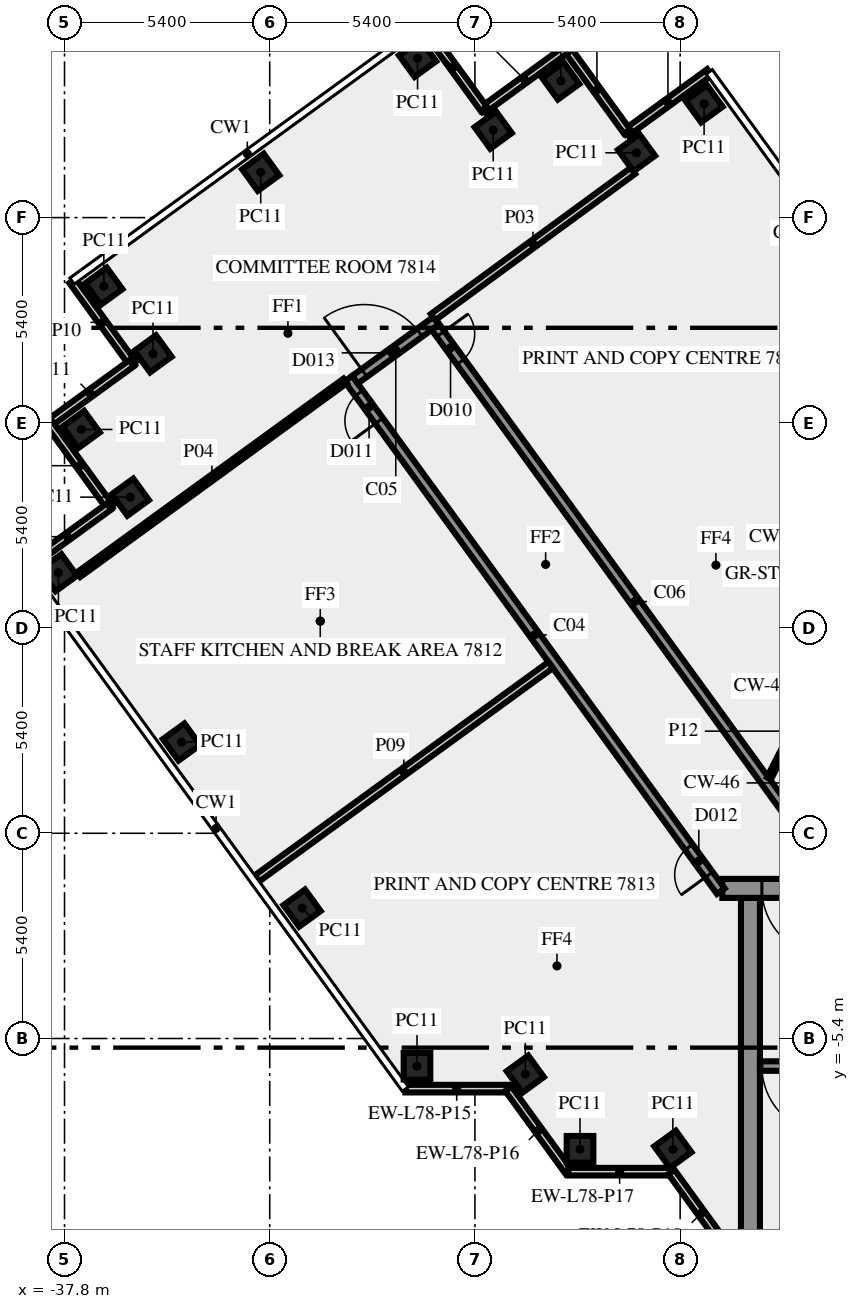
"""IFC4 building model, lengths in metres.
Left out: names, types, materials, properties, quantities, classifications, styles, units other than length and angle.
Written with IfcOpenShell. Run it as: python <this file> out.ifc"""

import sys

from ifc_helpers import new_model, si_unit, direction, frame, frame_2d, origin, origin_2d, place, context, subcontext, project, spatial, rectangle, extrude, element, fill, save


model = new_model("IFC4")
c1 = context("Model", 3, precision=1e-05, world=origin(), true_north=direction((0.0, 1.0)))
c2 = subcontext(c1, "Body", "Model", "MODEL_VIEW")
j1 = project(units=[si_unit("LENGTHUNIT", "METRE"), si_unit("PLANEANGLEUNIT", "RADIAN")], contexts=[c1])
p1 = place(None, origin())
s1 = spatial("IfcSite", under=j1, at=p1, CompositionType="ELEMENT")
p2 = place(p1, origin())
s2 = spatial("IfcBuilding", under=s1, at=p2, CompositionType="ELEMENT")
p3 = place(p2, frame((0.0, 0.0, 335.0)))
s3 = spatial("IfcBuildingStorey", under=s2, at=p3, CompositionType="ELEMENT", Elevation=335.0)
for number, where, z_axis, x_axis in (
    (1, (-20.97, 19.195, 0.0), (0.0, 0.0, 1.0), (-0.588, 0.809, 0.0)),
    (2, (-22.749, 17.904, 0.0), (0.0, 0.0, 1.0), (-0.588, 0.809, 0.0)),
    (3, (-24.74, 19.795, 0.0), (0.0, 0.0, 1.0), (-0.588, 0.809, 0.0)),
    (4, (-26.519, 18.5, 0.0), (0.0, 0.0, 1.0), (-0.588, 0.809, 0.0)),
    (5, (-28.51, 20.39, 0.0), (0.0, 0.0, 1.0), (-0.809, -0.588, 0.0)),
    (6, (-32.637, 17.393, 0.0), (0.0, 0.0, 1.0), (-0.809, -0.588, 0.0)),
    (7, (-36.765, 14.395, 0.0), (0.0, 0.0, 1.0), (0.588, -0.809, 0.0)),
    (8, (-35.471, 12.616, 0.0), (0.0, 0.0, 1.0), (-0.809, -0.588, 0.0)),
    (9, (-37.36, 10.625, 0.0), (0.0, 0.0, 1.0), (0.588, -0.809, 0.0)),
    (10, (-36.068, 8.844, 0.0), (0.0, 0.0, 1.0), (0.588, -0.809, 0.0)),
    (11, (-37.96, 6.855, 0.0), (0.0, 0.0, 1.0), (0.588, -0.809, 0.0)),
    (12, (-34.722, 2.4, 0.0), (0.0, 0.0, 1.0), (0.588, -0.809, 0.0)),
    (13, (-31.548, -1.969, 0.0), (0.0, 0.0, 1.0), (0.588, -0.809, 0.0)),
    (14, (-28.525, -6.13, 0.0), (0.0, 0.0, 1.0), (1.0, 0.0, 0.0)),
    (15, (-25.674, -6.337, 0.0), (0.0, 0.0, 1.0), (0.588, -0.809, 0.0)),
    (16, (-24.235, -8.315, 0.0), (0.0, 0.0, 1.0), (1.0, 0.0, 0.0)),
    (17, (-21.792, -8.315, 0.0), (0.0, 0.0, 1.0), (0.588, -0.809, 0.0)),
):
    element("IfcColumn", number, at=place(p3, frame(where, z_axis=z_axis, x_axis=x_axis)), inside=s3, PredefinedType="COLUMN", context=c2, shape_type="SweptSolid", body=[
        extrude(rectangle(XDim=0.7, YDim=0.7, at=origin_2d()), origin(), (0.0, 0.0, 1.0), 3.65),
    ])
for number, where, z_axis, x_axis in (
    (18, (-20.829, 20.025, 0.0), (0.0, 0.0, 1.0), (-0.809, -0.588, 0.0)),
    (19, (-22.996, 18.466, 0.0), (0.0, 0.0, 1.0), (-0.588, 0.809, 0.0)),
):
    element("IfcWall", number, at=place(p3, frame(where, z_axis=z_axis, x_axis=x_axis)), inside=s3, PredefinedType="SOLIDWALL", context=c2, shape_type="SweptSolid", body=[
        extrude(rectangle(XDim=2.7, YDim=0.2, at=frame_2d((1.35, 0.0))), origin(), (0.0, 0.0, 1.0), 3.65),
    ])
for number, where, z_axis, x_axis in (
    (20, (-24.6, 20.623, 0.0), (0.0, 0.0, 1.0), (-0.809, -0.588, 0.0)),
    (21, (-26.768, 19.063, 0.0), (0.0, 0.0, 1.0), (-0.588, 0.809, 0.0)),
):
    element("IfcWall", number, at=place(p3, frame(where, z_axis=z_axis, x_axis=x_axis)), inside=s3, PredefinedType="SOLIDWALL", context=c2, shape_type="SweptSolid", body=[
        extrude(rectangle(XDim=2.7, YDim=0.2, at=frame_2d((1.35, 0.0))), origin(), (0.0, 0.0, 1.0), 3.65),
    ])
for number, where, z_axis, x_axis in (
    (22, (-37.592, 14.536, 0.0), (0.0, 0.0, 1.0), (0.588, -0.809, 0.0)),
    (23, (-36.032, 12.369, 0.0), (0.0, 0.0, 1.0), (-0.809, -0.588, 0.0)),
    (24, (-38.189, 10.765, 0.0), (0.0, 0.0, 1.0), (0.588, -0.809, 0.0)),
    (25, (-36.629, 8.597, 0.0), (0.0, 0.0, 1.0), (-0.809, -0.588, 0.0)),
    (26, (-28.83, -6.719, 0.0), (0.0, 0.0, 1.0), (1.0, 0.0, 0.0)),
):
    element("IfcWall", number, at=place(p3, frame(where, z_axis=z_axis, x_axis=x_axis)), inside=s3, PredefinedType="SOLIDWALL", context=c2, shape_type="SweptSolid", body=[
        extrude(rectangle(XDim=2.7, YDim=0.2, at=frame_2d((1.35, 0.0))), origin(), (0.0, 0.0, 1.0), 3.65),
    ])
p4 = place(p3, frame((-26.12, -6.724, 0.0), z_axis=(0.0, 0.0, 1.0), x_axis=(0.587720002413, -0.809064397168, 0.0)))
e27 = element("IfcWall", 27, at=p4, inside=s3, PredefinedType="SOLIDWALL", context=c2, shape_type="SweptSolid", body=[
    extrude(rectangle(XDim=2.7, YDim=0.2, at=frame_2d((1.35, 0.0))), origin(), (0.0, 0.0, 1.0), 3.65),
])
p5 = place(p3, frame((-24.543, -8.904, 0.0), z_axis=(0.0, 0.0, 1.0), x_axis=(1.0, 0.0, 0.0)))
e28 = element("IfcWall", 28, at=p5, inside=s3, PredefinedType="SOLIDWALL", context=c2, shape_type="SweptSolid", body=[
    extrude(rectangle(XDim=2.7, YDim=0.2, at=frame_2d((1.35, 0.0))), origin(), (0.0, 0.0, 1.0), 3.65),
])
p6 = place(p3, frame((-21.833, -8.909, 0.0), z_axis=(0.0, 0.0, 1.0), x_axis=(0.587766567315, -0.809030569476, 0.0)))
e29 = element("IfcWall", 29, at=p6, inside=s3, PredefinedType="SOLIDWALL", context=c2, shape_type="SweptSolid", body=[
    extrude(rectangle(XDim=2.688, YDim=0.2, at=frame_2d((1.344, 0.0))), origin(), (0.0, 0.0, 1.0), 3.65),
])
p7 = place(p3, frame((-19.75, -10.5, 0.0), z_axis=(0.0, 0.0, 1.0), x_axis=(0.0, 1.0, 0.0)))
e30 = element("IfcWall", 30, at=p7, inside=s3, PredefinedType="SHEAR", context=c2, shape_type="SweptSolid", body=[
    extrude(rectangle(XDim=8.8, YDim=0.5, at=frame_2d((4.4, 0.0))), origin(), (0.0, 0.0, 1.0), 3.65),
])
p8 = place(p3, frame((-11.45, -6.125, 0.0), z_axis=(0.0, 0.0, 1.0), x_axis=(-1.0, 0.0, 0.0)))
e31 = element("IfcWall", 31, at=p8, inside=s3, PredefinedType="SHEAR", context=c2, shape_type="SweptSolid", body=[
    extrude(rectangle(XDim=8.05, YDim=0.25, at=frame_2d((4.025, 0.0))), origin(), (0.0, 0.0, 1.0), 3.65),
])
p9 = place(p8, frame((6.2, 0.0, 0.0)))
e32 = element("IfcOpeningElement", 32, at=p9, cuts=e31, PredefinedType="OPENING", context=c2, shape_type="SweptSolid", body=[
    extrude(rectangle(XDim=1.8, YDim=2.1, at=frame_2d((0.9, 1.05))), frame((0.0, 0.135, 0.0), z_axis=(0.0, -1.0, 0.0), x_axis=(1.0, 0.0, 0.0)), (0.0, 0.0, 1.0), 0.27),
])
p10 = place(p3, frame((20.49, -1.45, 0.0), z_axis=(0.0, 0.0, 1.0), x_axis=(-1.0, 0.0, 0.0)))
e33 = element("IfcWall", 33, at=p10, inside=s3, PredefinedType="SHEAR", context=c2, shape_type="SweptSolid", body=[
    extrude(rectangle(XDim=40.98, YDim=0.5, at=frame_2d((20.49, 0.0))), origin(), (0.0, 0.0, 1.0), 3.65),
])
p11 = place(p10, frame((38.14, 0.0, 0.0)))
e34 = element("IfcOpeningElement", 34, at=p11, cuts=e33, PredefinedType="OPENING", context=c2, shape_type="SweptSolid", body=[
    extrude(rectangle(XDim=1.8, YDim=2.1, at=frame_2d((0.9, 1.05))), frame((0.0, 0.26, 0.0), z_axis=(0.0, -1.0, 0.0), x_axis=(1.0, 0.0, 0.0)), (0.0, 0.0, 1.0), 0.52),
])
p12 = place(p10, frame((36.728, 0.0, 0.0)))
e35 = element("IfcOpeningElement", 35, at=p12, cuts=e33, PredefinedType="OPENING", context=c2, shape_type="SweptSolid", body=[
    extrude(rectangle(XDim=0.8, YDim=2.1, at=frame_2d((0.4, 1.05))), frame((0.0, 0.26, 0.0), z_axis=(0.0, -1.0, 0.0), x_axis=(1.0, 0.0, 0.0)), (0.0, 0.0, 1.0), 0.52),
])
p13 = place(p10, frame((35.153, 0.0, 0.0)))
e36 = element("IfcOpeningElement", 36, at=p13, cuts=e33, PredefinedType="OPENING", context=c2, shape_type="SweptSolid", body=[
    extrude(rectangle(XDim=0.8, YDim=2.1, at=frame_2d((0.4, 1.05))), frame((0.0, 0.26, 0.0), z_axis=(0.0, -1.0, 0.0), x_axis=(1.0, 0.0, 0.0)), (0.0, 0.0, 1.0), 0.52),
])
p14 = place(p10, frame((32.94, 0.0, 0.0)))
e37 = element("IfcOpeningElement", 37, at=p14, cuts=e33, PredefinedType="OPENING", context=c2, shape_type="SweptSolid", body=[
    extrude(rectangle(XDim=0.9, YDim=2.1, at=frame_2d((0.45, 1.05))), frame((0.0, 0.26, 0.0), z_axis=(0.0, -1.0, 0.0), x_axis=(1.0, 0.0, 0.0)), (0.0, 0.0, 1.0), 0.52),
])
p15 = place(p10, frame((31.015, 0.0, 0.0)))
e38 = element("IfcOpeningElement", 38, at=p15, cuts=e33, PredefinedType="OPENING", context=c2, shape_type="SweptSolid", body=[
    extrude(rectangle(XDim=0.8, YDim=2.1, at=frame_2d((0.4, 1.05))), frame((0.0, 0.26, 0.0), z_axis=(0.0, -1.0, 0.0), x_axis=(1.0, 0.0, 0.0)), (0.0, 0.0, 1.0), 0.52),
])
p16 = place(p10, frame((24.765, 0.0, 0.0)))
e39 = element("IfcOpeningElement", 39, at=p16, cuts=e33, PredefinedType="OPENING", context=c2, shape_type="SweptSolid", body=[
    extrude(rectangle(XDim=0.8, YDim=2.1, at=frame_2d((0.4, 1.05))), frame((0.0, 0.26, 0.0), z_axis=(0.0, -1.0, 0.0), x_axis=(1.0, 0.0, 0.0)), (0.0, 0.0, 1.0), 0.52),
])
p17 = place(p10, frame((19.59, 0.0, 0.0)))
e40 = element("IfcOpeningElement", 40, at=p17, cuts=e33, PredefinedType="OPENING", context=c2, shape_type="SweptSolid", body=[
    extrude(rectangle(XDim=2.0, YDim=2.1, at=frame_2d((1.0, 1.05))), frame((0.0, 0.26, 0.0), z_axis=(0.0, -1.0, 0.0), x_axis=(1.0, 0.0, 0.0)), (0.0, 0.0, 1.0), 0.52),
])
p18 = place(p10, frame((15.103, 0.0, 0.0)))
e41 = element("IfcOpeningElement", 41, at=p18, cuts=e33, PredefinedType="OPENING", context=c2, shape_type="SweptSolid", body=[
    extrude(rectangle(XDim=0.9, YDim=2.1, at=frame_2d((0.45, 1.05))), frame((0.0, 0.26, 0.0), z_axis=(0.0, -1.0, 0.0), x_axis=(1.0, 0.0, 0.0)), (0.0, 0.0, 1.0), 0.52),
])
p19 = place(p10, frame((13.04, 0.0, 0.0)))
e42 = element("IfcOpeningElement", 42, at=p19, cuts=e33, PredefinedType="OPENING", context=c2, shape_type="SweptSolid", body=[
    extrude(rectangle(XDim=0.9, YDim=2.1, at=frame_2d((0.45, 1.05))), frame((0.0, 0.26, 0.0), z_axis=(0.0, -1.0, 0.0), x_axis=(1.0, 0.0, 0.0)), (0.0, 0.0, 1.0), 0.52),
])
p20 = place(p10, frame((10.177, 0.0, 0.0)))
e43 = element("IfcOpeningElement", 43, at=p20, cuts=e33, PredefinedType="OPENING", context=c2, shape_type="SweptSolid", body=[
    extrude(rectangle(XDim=0.9, YDim=2.1, at=frame_2d((0.45, 1.05))), frame((0.0, 0.26, 0.0), z_axis=(0.0, -1.0, 0.0), x_axis=(1.0, 0.0, 0.0)), (0.0, 0.0, 1.0), 0.52),
])
p21 = place(p10, frame((7.14, 0.0, 0.0)))
e44 = element("IfcOpeningElement", 44, at=p21, cuts=e33, PredefinedType="OPENING", context=c2, shape_type="SweptSolid", body=[
    extrude(rectangle(XDim=0.9, YDim=2.1, at=frame_2d((0.45, 1.05))), frame((0.0, 0.26, 0.0), z_axis=(0.0, -1.0, 0.0), x_axis=(1.0, 0.0, 0.0)), (0.0, 0.0, 1.0), 0.52),
])
p22 = place(p10, frame((4.19, 0.0, 0.0)))
e45 = element("IfcOpeningElement", 45, at=p22, cuts=e33, PredefinedType="OPENING", context=c2, shape_type="SweptSolid", body=[
    extrude(rectangle(XDim=0.9, YDim=2.1, at=frame_2d((0.45, 1.05))), frame((0.0, 0.26, 0.0), z_axis=(0.0, -1.0, 0.0), x_axis=(1.0, 0.0, 0.0)), (0.0, 0.0, 1.0), 0.52),
])
p23 = place(p10, frame((1.04, 0.0, 0.0)))
e46 = element("IfcOpeningElement", 46, at=p23, cuts=e33, PredefinedType="OPENING", context=c2, shape_type="SweptSolid", body=[
    extrude(rectangle(XDim=1.8, YDim=2.1, at=frame_2d((0.9, 1.05))), frame((0.0, 0.26, 0.0), z_axis=(0.0, -1.0, 0.0), x_axis=(1.0, 0.0, 0.0)), (0.0, 0.0, 1.0), 0.52),
])
p24 = place(p3, frame((-20.531, -1.523, 0.0), z_axis=(0.0, 0.0, 1.0), x_axis=(-0.587785867777, 0.809016547199, 0.0)))
e47 = element("IfcWall", 47, at=p24, inside=s3, PredefinedType="SOLIDWALL", context=c2, shape_type="SweptSolid", body=[
    extrude(rectangle(XDim=16.67, YDim=0.25, at=frame_2d((8.335, 0.0))), origin(), (0.0, 0.0, 1.0), 3.65),
])
p25 = place(p24, frame((0.533, 0.0, 0.0)))
e48 = element("IfcOpeningElement", 48, at=p25, cuts=e47, PredefinedType="OPENING", context=c2, shape_type="SweptSolid", body=[
    extrude(rectangle(XDim=0.9, YDim=2.1, at=frame_2d((0.45, 1.05))), frame((0.0, 0.135, 0.0), z_axis=(0.0, -1.0, 0.0), x_axis=(1.0, 0.0, 0.0)), (0.0, 0.0, 1.0), 0.27),
])
p26 = place(p24, frame((15.296, 0.0, 0.0)))
e49 = element("IfcOpeningElement", 49, at=p26, cuts=e47, PredefinedType="OPENING", context=c2, shape_type="SweptSolid", body=[
    extrude(rectangle(XDim=0.9, YDim=2.1, at=frame_2d((0.45, 1.05))), frame((0.0, 0.135, 0.0), z_axis=(0.0, -1.0, 0.0), x_axis=(1.0, 0.0, 0.0)), (0.0, 0.0, 1.0), 0.27),
])
p27 = place(p3, frame((-30.155, 11.936, 0.0), z_axis=(0.0, 0.0, 1.0), x_axis=(0.809038743598, 0.587755315891, 0.0)))
e50 = element("IfcWall", 50, at=p27, inside=s3, PredefinedType="SOLIDWALL", context=c2, shape_type="SweptSolid", body=[
    extrude(rectangle(XDim=2.65, YDim=0.25, at=frame_2d((1.325, 0.0))), origin(), (0.0, 0.0, 1.0), 3.65),
])
p28 = place(p27, frame((0.3, 0.0, 0.0)))
e51 = element("IfcOpeningElement", 51, at=p28, cuts=e50, PredefinedType="OPENING", context=c2, shape_type="SweptSolid", body=[
    extrude(rectangle(XDim=1.8, YDim=2.1, at=frame_2d((0.9, 1.05))), frame((0.0, 0.135, 0.0), z_axis=(0.0, -1.0, 0.0), x_axis=(1.0, 0.0, 0.0)), (0.0, 0.0, 1.0), 0.27),
])
p29 = place(p3, frame((-28.039, 13.319, 0.0), z_axis=(0.0, 0.0, 1.0), x_axis=(0.587791911753, -0.809012155952, 0.0)))
e52 = element("IfcWall", 52, at=p29, inside=s3, PredefinedType="SOLIDWALL", context=c2, shape_type="SweptSolid", body=[
    extrude(rectangle(XDim=17.853, YDim=0.25, at=frame_2d((8.927, 0.0))), origin(), (0.0, 0.0, 1.0), 3.65),
])
p30 = place(p29, frame((0.225, 0.0, 0.0)))
e53 = element("IfcOpeningElement", 53, at=p30, cuts=e52, PredefinedType="OPENING", context=c2, shape_type="SweptSolid", body=[
    extrude(rectangle(XDim=0.9, YDim=2.1, at=frame_2d((0.45, 1.05))), frame((0.0, 0.135, 0.0), z_axis=(0.0, -1.0, 0.0), x_axis=(1.0, 0.0, 0.0)), (0.0, 0.0, 1.0), 0.27),
])
p31 = place(p3, frame((-28.101, 13.583, 0.0), z_axis=(0.0, 0.0, 1.0), x_axis=(0.80699548015, 0.590557613631, 0.0)))
e54 = element("IfcWall", 54, at=p31, inside=s3, PredefinedType="SOLIDWALL", context=c2, shape_type="SweptSolid", body=[
    extrude(rectangle(XDim=6.515, YDim=0.2, at=frame_2d((3.258, 0.0))), origin(), (0.0, 0.0, 1.0), 3.65),
])
p32 = place(p3, frame((-37.429, 6.805, 0.0), z_axis=(0.0, 0.0, 1.0), x_axis=(0.809020922653, 0.587779845444, 0.0)))
e55 = element("IfcWall", 55, at=p32, inside=s3, PredefinedType="PARTITIONING", context=c2, shape_type="SweptSolid", body=[
    extrude(rectangle(XDim=8.67, YDim=0.15, at=frame_2d((4.335, 0.0))), origin(), (0.0, 0.0, 1.0), 3.65),
])
p33 = place(p3, frame((-25.008, 4.427, 0.0), z_axis=(0.0, 0.0, 1.0), x_axis=(-0.808994684961, -0.587815957341, 0.0)))
e56 = element("IfcWall", 56, at=p33, inside=s3, PredefinedType="SOLIDWALL", context=c2, shape_type="SweptSolid", body=[
    extrude(rectangle(XDim=9.55, YDim=0.2, at=frame_2d((4.775, 0.0))), origin(), (0.0, 0.0, 1.0), 2.95),
])
p34 = place(p3, frame((-19.261, 1.45, 0.0), z_axis=(0.0, 0.0, 1.0), x_axis=(0.453950796792, 0.891026752736, 0.0)))
e57 = element("IfcWall", 57, at=p34, inside=s3, PredefinedType="PARTITIONING", context=c2, shape_type="SweptSolid", body=[
    extrude(rectangle(XDim=2.778, YDim=0.12, at=frame_2d((1.389, 0.0))), origin(), (0.0, 0.0, 1.0), 3.65),
])
p35 = place(p9, origin())
e58 = element("IfcDoor", 58, at=p35, inside=s3, OperationType="DOUBLE_DOOR_SINGLE_SWING", PredefinedType="DOOR", context=c2, shape_type="SweptSolid", body=[
    extrude(rectangle(XDim=1.8, YDim=2.1, at=frame_2d((0.9, 1.05))), frame((0.0, 0.025, 0.0), z_axis=(0.0, -1.0, 0.0), x_axis=(1.0, 0.0, 0.0)), (0.0, 0.0, 1.0), 0.05),
])
fill(e32, e58)
p36 = place(p11, origin())
e59 = element("IfcDoor", 59, at=p36, inside=s3, OperationType="DOUBLE_DOOR_SINGLE_SWING", PredefinedType="DOOR", context=c2, shape_type="SweptSolid", body=[
    extrude(rectangle(XDim=1.8, YDim=2.1, at=frame_2d((0.9, 1.05))), frame((0.0, 0.025, 0.0), z_axis=(0.0, -1.0, 0.0), x_axis=(1.0, 0.0, 0.0)), (0.0, 0.0, 1.0), 0.05),
])
fill(e34, e59)
p37 = place(p28, origin())
e60 = element("IfcDoor", 60, at=p37, inside=s3, OperationType="DOUBLE_DOOR_SINGLE_SWING", PredefinedType="DOOR", context=c2, shape_type="SweptSolid", body=[
    extrude(rectangle(XDim=1.8, YDim=2.1, at=frame_2d((0.9, 1.05))), frame((0.0, 0.025, 0.0), z_axis=(0.0, -1.0, 0.0), x_axis=(1.0, 0.0, 0.0)), (0.0, 0.0, 1.0), 0.05),
])
fill(e51, e60)
p38 = place(p30, origin())
e61 = element("IfcDoor", 61, at=p38, inside=s3, OperationType="SINGLE_SWING_LEFT", PredefinedType="DOOR", context=c2, shape_type="SweptSolid", body=[
    extrude(rectangle(XDim=0.9, YDim=2.1, at=frame_2d((0.45, 1.05))), frame((0.0, 0.025, 0.0), z_axis=(0.0, -1.0, 0.0), x_axis=(1.0, 0.0, 0.0)), (0.0, 0.0, 1.0), 0.05),
])
fill(e53, e61)
p39 = place(p25, origin())
e62 = element("IfcDoor", 62, at=p39, inside=s3, OperationType="SINGLE_SWING_LEFT", PredefinedType="DOOR", context=c2, shape_type="SweptSolid", body=[
    extrude(rectangle(XDim=0.9, YDim=2.1, at=frame_2d((0.45, 1.05))), frame((0.0, 0.025, 0.0), z_axis=(0.0, -1.0, 0.0), x_axis=(1.0, 0.0, 0.0)), (0.0, 0.0, 1.0), 0.05),
])
fill(e48, e62)
p40 = place(p26, origin())
e63 = element("IfcDoor", 63, at=p40, inside=s3, OperationType="SINGLE_SWING_RIGHT", PredefinedType="DOOR", context=c2, shape_type="SweptSolid", body=[
    extrude(rectangle(XDim=0.9, YDim=2.1, at=frame_2d((0.45, 1.05))), frame((0.0, 0.025, 0.0), z_axis=(0.0, -1.0, 0.0), x_axis=(1.0, 0.0, 0.0)), (0.0, 0.0, 1.0), 0.05),
])
fill(e49, e63)
save(model, sys.argv[1])
